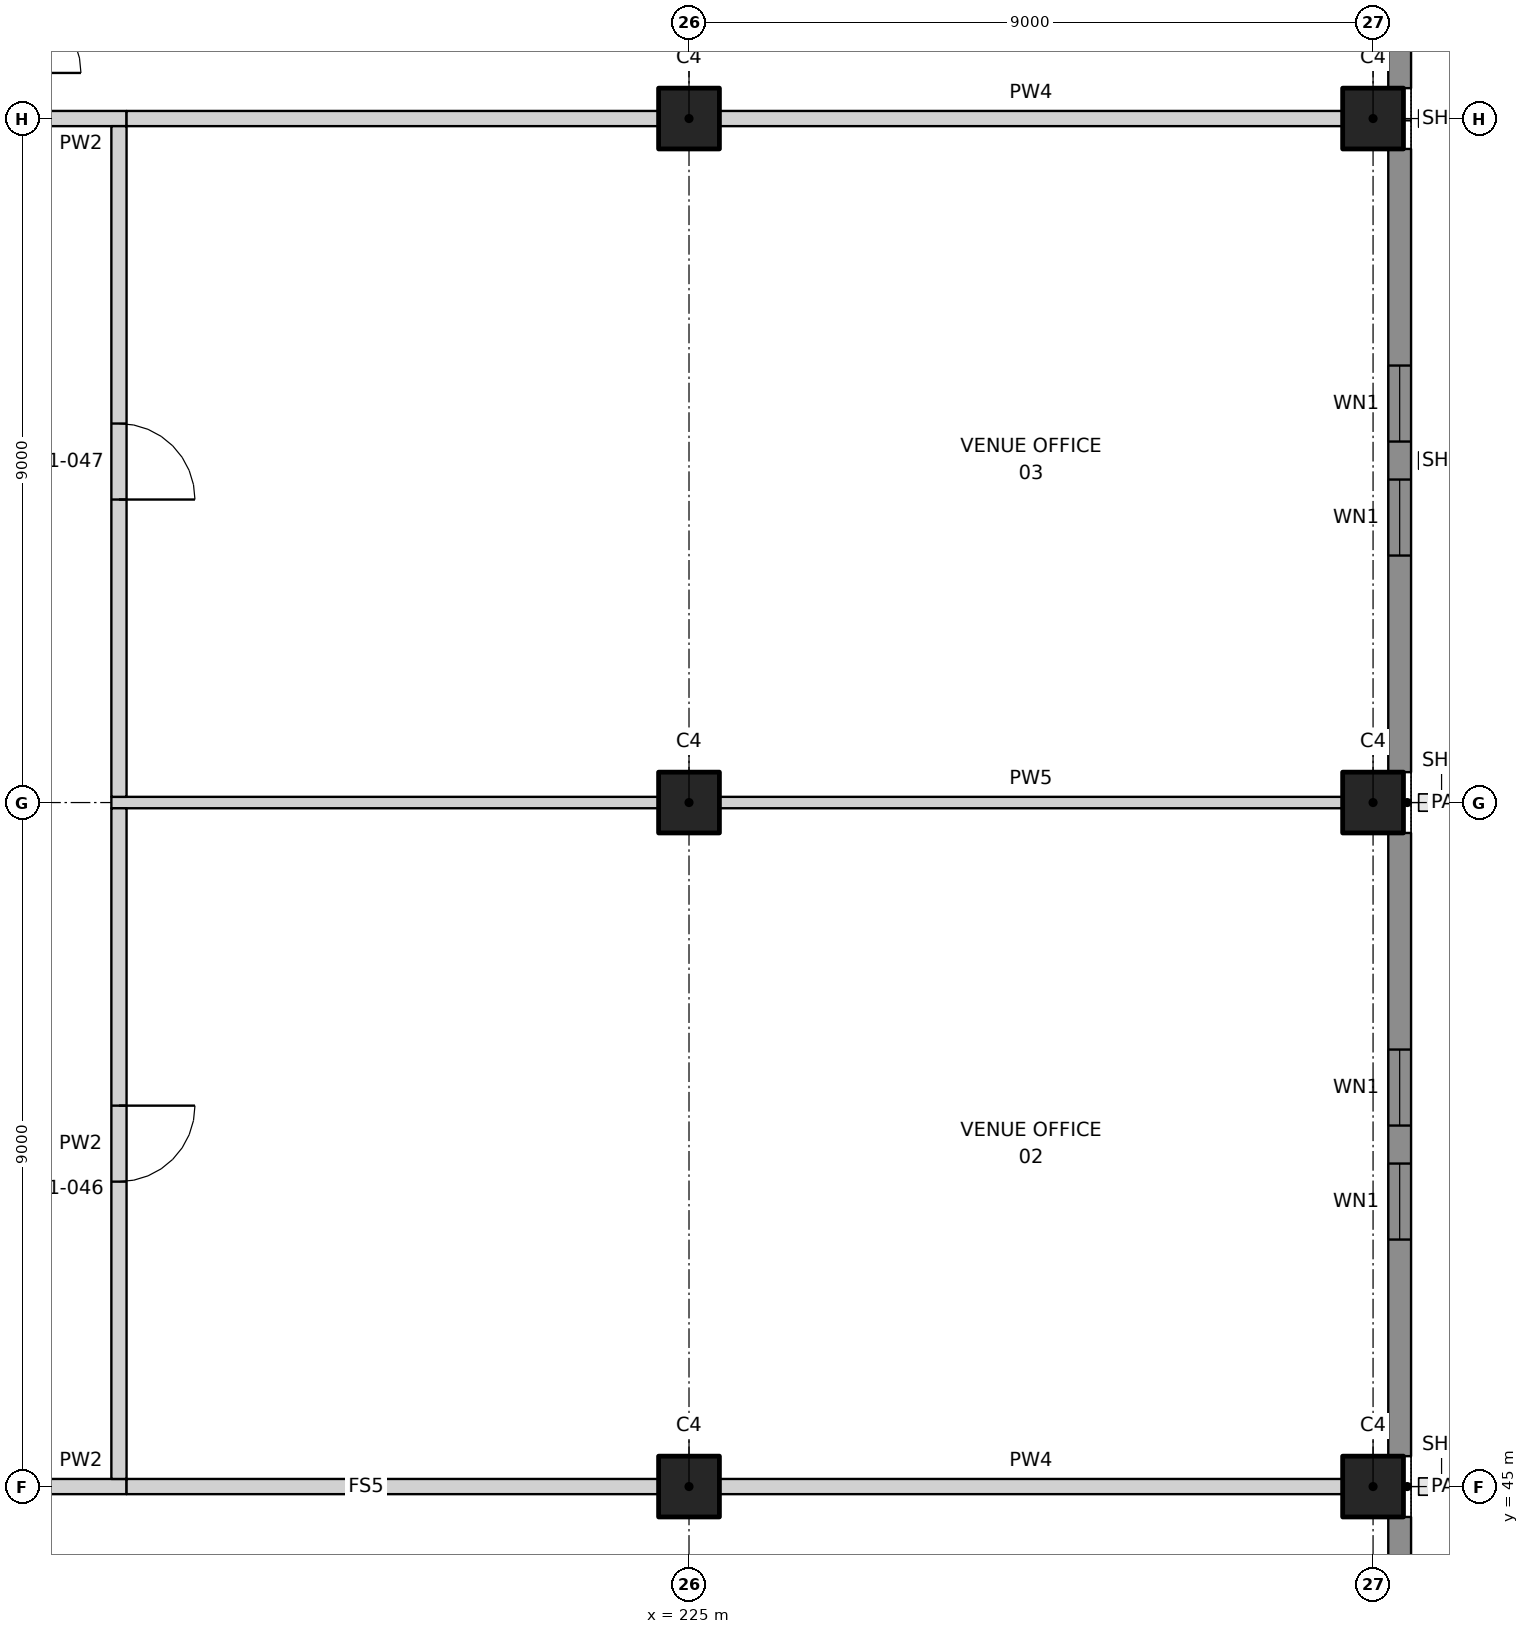
"""IFC4 building model, lengths in metres.
Left out: names, types, materials, properties, quantities, classifications, styles, units other than length and angle.
Written with IfcOpenShell. Run it as: python <this file> out.ifc"""

import sys

from ifc_helpers import new_model, si_unit, direction, frame, frame_2d, origin, origin_2d, place, context, subcontext, project, spatial, rectangle, extrude, element, fill, save


model = new_model("IFC4")
c1 = context("Model", 3, precision=1e-05, world=origin(), true_north=direction((0.0, 1.0)))
c2 = subcontext(c1, "Body", "Model", "MODEL_VIEW")
j1 = project(units=[si_unit("LENGTHUNIT", "METRE"), si_unit("PLANEANGLEUNIT", "RADIAN")], contexts=[c1])
p1 = place(None, origin())
s1 = spatial("IfcSite", under=j1, at=p1, CompositionType="ELEMENT")
p2 = place(p1, origin())
s2 = spatial("IfcBuilding", under=s1, at=p2, CompositionType="ELEMENT")
p3 = place(p2, frame((0.0, 0.0, 7.0)))
s3 = spatial("IfcBuildingStorey", under=s2, at=p3, CompositionType="ELEMENT", Elevation=7.0)
for number, where, z_axis, x_axis in (
    (1, (225.0, 45.0, 0.0), (0.0, 0.0, 1.0), (1.0, 0.0, 0.0)),
    (2, (225.0, 54.0, 0.0), (0.0, 0.0, 1.0), (1.0, 0.0, 0.0)),
    (3, (225.0, 63.0, 0.0), (0.0, 0.0, 1.0), (1.0, 0.0, 0.0)),
    (4, (234.0, 45.0, 0.0), (0.0, 0.0, 1.0), (1.0, 0.0, 0.0)),
    (5, (234.0, 54.0, 0.0), (0.0, 0.0, 1.0), (1.0, 0.0, 0.0)),
    (6, (234.0, 63.0, 0.0), (0.0, 0.0, 1.0), (1.0, 0.0, 0.0)),
):
    element("IfcColumn", number, at=place(p3, frame(where, z_axis=z_axis, x_axis=x_axis)), inside=s3, PredefinedType="COLUMN", context=c2, shape_type="SweptSolid", body=[
        extrude(rectangle(XDim=0.8, YDim=0.8, at=origin_2d()), origin(), (0.0, 0.0, 1.0), 4.5),
    ])
p4 = place(p3, frame((216.4, 45.0, 0.0), z_axis=(0.0, 0.0, 1.0), x_axis=(1.0, 0.0, 0.0)))
e7 = element("IfcWall", 7, at=p4, inside=s3, PredefinedType="PARTITIONING", context=c2, shape_type="SweptSolid", body=[
    extrude(rectangle(XDim=1.2, YDim=0.2, at=frame_2d((0.6, 0.0))), origin(), (0.0, 0.0, 1.0), 3.25),
])
p5 = place(p3, frame((225.4, 45.0, 0.0), z_axis=(0.0, 0.0, 1.0), x_axis=(1.0, 0.0, 0.0)))
e8 = element("IfcWall", 8, at=p5, inside=s3, PredefinedType="PARTITIONING", context=c2, shape_type="SweptSolid", body=[
    extrude(rectangle(XDim=8.2, YDim=0.2, at=frame_2d((4.1, 0.0))), origin(), (0.0, 0.0, 1.0), 3.25),
])
p6 = place(p3, frame((217.6, 45.0, 0.0), z_axis=(0.0, 0.0, 1.0), x_axis=(1.0, 0.0, 0.0)))
e9 = element("IfcWall", 9, at=p6, inside=s3, PredefinedType="PARTITIONING", context=c2, shape_type="SweptSolid", body=[
    extrude(rectangle(XDim=7.0, YDim=0.2, at=frame_2d((3.5, 0.0))), origin(), (0.0, 0.0, 1.0), 3.25),
])
p7 = place(p3, frame((225.4, 54.0, 0.0), z_axis=(0.0, 0.0, 1.0), x_axis=(1.0, 0.0, 0.0)))
e10 = element("IfcWall", 10, at=p7, inside=s3, PredefinedType="PARTITIONING", context=c2, shape_type="SweptSolid", body=[
    extrude(rectangle(XDim=8.2, YDim=0.15, at=frame_2d((4.1, 0.0))), origin(), (0.0, 0.0, 1.0), 3.25),
])
p8 = place(p3, frame((217.4, 54.0, 0.0), z_axis=(0.0, 0.0, 1.0), x_axis=(1.0, 0.0, 0.0)))
e11 = element("IfcWall", 11, at=p8, inside=s3, PredefinedType="PARTITIONING", context=c2, shape_type="SweptSolid", body=[
    extrude(rectangle(XDim=7.2, YDim=0.15, at=frame_2d((3.6, 0.0))), origin(), (0.0, 0.0, 1.0), 3.25),
])
p9 = place(p3, frame((216.4, 63.0, 0.0), z_axis=(0.0, 0.0, 1.0), x_axis=(1.0, 0.0, 0.0)))
e12 = element("IfcWall", 12, at=p9, inside=s3, PredefinedType="PARTITIONING", context=c2, shape_type="SweptSolid", body=[
    extrude(rectangle(XDim=1.2, YDim=0.2, at=frame_2d((0.6, 0.0))), origin(), (0.0, 0.0, 1.0), 3.25),
])
p10 = place(p3, frame((225.4, 63.0, 0.0), z_axis=(0.0, 0.0, 1.0), x_axis=(1.0, 0.0, 0.0)))
e13 = element("IfcWall", 13, at=p10, inside=s3, PredefinedType="PARTITIONING", context=c2, shape_type="SweptSolid", body=[
    extrude(rectangle(XDim=8.2, YDim=0.2, at=frame_2d((4.1, 0.0))), origin(), (0.0, 0.0, 1.0), 3.25),
])
p11 = place(p3, frame((217.6, 63.0, 0.0), z_axis=(0.0, 0.0, 1.0), x_axis=(1.0, 0.0, 0.0)))
e14 = element("IfcWall", 14, at=p11, inside=s3, PredefinedType="PARTITIONING", context=c2, shape_type="SweptSolid", body=[
    extrude(rectangle(XDim=7.0, YDim=0.2, at=frame_2d((3.5, 0.0))), origin(), (0.0, 0.0, 1.0), 3.25),
])
p12 = place(p3, frame((217.5, 45.1, 0.0), z_axis=(0.0, 0.0, 1.0), x_axis=(0.0, 1.0, 0.0)))
e15 = element("IfcWall", 15, at=p12, inside=s3, PredefinedType="PARTITIONING", context=c2, shape_type="SweptSolid", body=[
    extrude(rectangle(XDim=8.825, YDim=0.2, at=frame_2d((4.413, 0.0))), origin(), (0.0, 0.0, 1.0), 4.5),
])
p13 = place(p12, frame((3.912, 0.0, 0.0)))
e16 = element("IfcOpeningElement", 16, at=p13, cuts=e15, PredefinedType="OPENING", context=c2, shape_type="SweptSolid", body=[
    extrude(rectangle(XDim=1.0, YDim=2.1, at=frame_2d((0.5, 1.05))), frame((0.0, 0.11, 0.0), z_axis=(0.0, -1.0, 0.0), x_axis=(1.0, 0.0, 0.0)), (0.0, 0.0, 1.0), 0.22),
])
p14 = place(p3, frame((217.5, 54.075, 0.0), z_axis=(0.0, 0.0, 1.0), x_axis=(0.0, 1.0, 0.0)))
e17 = element("IfcWall", 17, at=p14, inside=s3, PredefinedType="PARTITIONING", context=c2, shape_type="SweptSolid", body=[
    extrude(rectangle(XDim=8.825, YDim=0.2, at=frame_2d((4.413, 0.0))), origin(), (0.0, 0.0, 1.0), 4.5),
])
p15 = place(p14, frame((3.912, 0.0, 0.0)))
e18 = element("IfcOpeningElement", 18, at=p15, cuts=e17, PredefinedType="OPENING", context=c2, shape_type="SweptSolid", body=[
    extrude(rectangle(XDim=1.0, YDim=2.1, at=frame_2d((0.5, 1.05))), frame((0.0, 0.11, 0.0), z_axis=(0.0, -1.0, 0.0), x_axis=(1.0, 0.0, 0.0)), (0.0, 0.0, 1.0), 0.22),
])
p16 = place(p3, frame((234.35, 36.0, 0.0), z_axis=(0.0, 0.0, 1.0), x_axis=(0.0, 1.0, 0.0)))
e19 = element("IfcWall", 19, at=p16, inside=s3, PredefinedType="SOLIDWALL", context=c2, shape_type="SweptSolid", body=[
    extrude(rectangle(XDim=8.6, YDim=0.3, at=frame_2d((4.3, 0.0))), origin(), (0.0, 0.0, 1.0), 4.5),
])
p17 = place(p16, frame((3.25, 0.0, 0.9)))
e20 = element("IfcOpeningElement", 20, at=p17, cuts=e19, PredefinedType="OPENING", context=c2, shape_type="SweptSolid", body=[
    extrude(rectangle(XDim=1.0, YDim=2.1, at=frame_2d((0.5, 1.05))), frame((0.0, 0.16, 0.0), z_axis=(0.0, -1.0, 0.0), x_axis=(1.0, 0.0, 0.0)), (0.0, 0.0, 1.0), 0.32),
])
p18 = place(p16, frame((4.75, 0.0, 0.9)))
e21 = element("IfcOpeningElement", 21, at=p18, cuts=e19, PredefinedType="OPENING", context=c2, shape_type="SweptSolid", body=[
    extrude(rectangle(XDim=1.0, YDim=2.1, at=frame_2d((0.5, 1.05))), frame((0.0, 0.16, 0.0), z_axis=(0.0, -1.0, 0.0), x_axis=(1.0, 0.0, 0.0)), (0.0, 0.0, 1.0), 0.32),
])
p19 = place(p3, frame((234.35, 45.4, 0.0), z_axis=(0.0, 0.0, 1.0), x_axis=(0.0, 1.0, 0.0)))
e22 = element("IfcWall", 22, at=p19, inside=s3, PredefinedType="SOLIDWALL", context=c2, shape_type="SweptSolid", body=[
    extrude(rectangle(XDim=8.2, YDim=0.3, at=frame_2d((4.1, 0.0))), origin(), (0.0, 0.0, 1.0), 4.5),
])
p20 = place(p19, frame((2.85, 0.0, 0.9)))
e23 = element("IfcOpeningElement", 23, at=p20, cuts=e22, PredefinedType="OPENING", context=c2, shape_type="SweptSolid", body=[
    extrude(rectangle(XDim=1.0, YDim=2.1, at=frame_2d((0.5, 1.05))), frame((0.0, 0.16, 0.0), z_axis=(0.0, -1.0, 0.0), x_axis=(1.0, 0.0, 0.0)), (0.0, 0.0, 1.0), 0.32),
])
p21 = place(p19, frame((4.35, 0.0, 0.9)))
e24 = element("IfcOpeningElement", 24, at=p21, cuts=e22, PredefinedType="OPENING", context=c2, shape_type="SweptSolid", body=[
    extrude(rectangle(XDim=1.0, YDim=2.1, at=frame_2d((0.5, 1.05))), frame((0.0, 0.16, 0.0), z_axis=(0.0, -1.0, 0.0), x_axis=(1.0, 0.0, 0.0)), (0.0, 0.0, 1.0), 0.32),
])
p22 = place(p3, frame((234.35, 54.4, 0.0), z_axis=(0.0, 0.0, 1.0), x_axis=(0.0, 1.0, 0.0)))
e25 = element("IfcWall", 25, at=p22, inside=s3, PredefinedType="SOLIDWALL", context=c2, shape_type="SweptSolid", body=[
    extrude(rectangle(XDim=8.2, YDim=0.3, at=frame_2d((4.1, 0.0))), origin(), (0.0, 0.0, 1.0), 4.5),
])
p23 = place(p22, frame((2.85, 0.0, 0.9)))
e26 = element("IfcOpeningElement", 26, at=p23, cuts=e25, PredefinedType="OPENING", context=c2, shape_type="SweptSolid", body=[
    extrude(rectangle(XDim=1.0, YDim=2.1, at=frame_2d((0.5, 1.05))), frame((0.0, 0.16, 0.0), z_axis=(0.0, -1.0, 0.0), x_axis=(1.0, 0.0, 0.0)), (0.0, 0.0, 1.0), 0.32),
])
p24 = place(p22, frame((4.35, 0.0, 0.9)))
e27 = element("IfcOpeningElement", 27, at=p24, cuts=e25, PredefinedType="OPENING", context=c2, shape_type="SweptSolid", body=[
    extrude(rectangle(XDim=1.0, YDim=2.1, at=frame_2d((0.5, 1.05))), frame((0.0, 0.16, 0.0), z_axis=(0.0, -1.0, 0.0), x_axis=(1.0, 0.0, 0.0)), (0.0, 0.0, 1.0), 0.32),
])
p25 = place(p3, frame((234.35, 63.4, 0.0), z_axis=(0.0, 0.0, 1.0), x_axis=(0.0, 1.0, 0.0)))
e28 = element("IfcWall", 28, at=p25, inside=s3, PredefinedType="SOLIDWALL", context=c2, shape_type="SweptSolid", body=[
    extrude(rectangle(XDim=8.2, YDim=0.3, at=frame_2d((4.1, 0.0))), origin(), (0.0, 0.0, 1.0), 4.5),
])
p26 = place(p25, frame((2.85, 0.0, 0.9)))
e29 = element("IfcOpeningElement", 29, at=p26, cuts=e28, PredefinedType="OPENING", context=c2, shape_type="SweptSolid", body=[
    extrude(rectangle(XDim=1.0, YDim=2.1, at=frame_2d((0.5, 1.05))), frame((0.0, 0.16, 0.0), z_axis=(0.0, -1.0, 0.0), x_axis=(1.0, 0.0, 0.0)), (0.0, 0.0, 1.0), 0.32),
])
p27 = place(p25, frame((4.35, 0.0, 0.9)))
e30 = element("IfcOpeningElement", 30, at=p27, cuts=e28, PredefinedType="OPENING", context=c2, shape_type="SweptSolid", body=[
    extrude(rectangle(XDim=1.0, YDim=2.1, at=frame_2d((0.5, 1.05))), frame((0.0, 0.16, 0.0), z_axis=(0.0, -1.0, 0.0), x_axis=(1.0, 0.0, 0.0)), (0.0, 0.0, 1.0), 0.32),
])
p28 = place(p13, frame((1.0, 0.0, 0.0), z_axis=(0.0, 0.0, 1.0), x_axis=(-1.0, 0.0, 0.0)))
e31 = element("IfcDoor", 31, at=p28, inside=s3, OperationType="SINGLE_SWING_LEFT", PredefinedType="DOOR", context=c2, shape_type="SweptSolid", body=[
    extrude(rectangle(XDim=1.0, YDim=2.1, at=frame_2d((0.5, 1.05))), frame((0.0, 0.025, 0.0), z_axis=(0.0, -1.0, 0.0), x_axis=(1.0, 0.0, 0.0)), (0.0, 0.0, 1.0), 0.05),
])
fill(e16, e31)
p29 = place(p15, frame((1.0, 0.0, 0.0), z_axis=(0.0, 0.0, 1.0), x_axis=(-1.0, 0.0, 0.0)))
e32 = element("IfcDoor", 32, at=p29, inside=s3, OperationType="SINGLE_SWING_RIGHT", PredefinedType="DOOR", context=c2, shape_type="SweptSolid", body=[
    extrude(rectangle(XDim=1.0, YDim=2.1, at=frame_2d((0.5, 1.05))), frame((0.0, 0.025, 0.0), z_axis=(0.0, -1.0, 0.0), x_axis=(1.0, 0.0, 0.0)), (0.0, 0.0, 1.0), 0.05),
])
fill(e18, e32)
p30 = place(p20, origin())
e33 = element("IfcWindow", 33, at=p30, inside=s3, PartitioningType="SINGLE_PANEL", PredefinedType="WINDOW", context=c2, shape_type="SweptSolid", body=[
    extrude(rectangle(XDim=1.0, YDim=2.1, at=frame_2d((0.5, 1.05))), frame((0.0, 0.03, 0.0), z_axis=(0.0, -1.0, 0.0), x_axis=(1.0, 0.0, 0.0)), (0.0, 0.0, 1.0), 0.06),
])
fill(e23, e33)
p31 = place(p21, origin())
e34 = element("IfcWindow", 34, at=p31, inside=s3, PartitioningType="SINGLE_PANEL", PredefinedType="WINDOW", context=c2, shape_type="SweptSolid", body=[
    extrude(rectangle(XDim=1.0, YDim=2.1, at=frame_2d((0.5, 1.05))), frame((0.0, 0.03, 0.0), z_axis=(0.0, -1.0, 0.0), x_axis=(1.0, 0.0, 0.0)), (0.0, 0.0, 1.0), 0.06),
])
fill(e24, e34)
p32 = place(p23, origin())
e35 = element("IfcWindow", 35, at=p32, inside=s3, PartitioningType="SINGLE_PANEL", PredefinedType="WINDOW", context=c2, shape_type="SweptSolid", body=[
    extrude(rectangle(XDim=1.0, YDim=2.1, at=frame_2d((0.5, 1.05))), frame((0.0, 0.03, 0.0), z_axis=(0.0, -1.0, 0.0), x_axis=(1.0, 0.0, 0.0)), (0.0, 0.0, 1.0), 0.06),
])
fill(e26, e35)
p33 = place(p24, origin())
e36 = element("IfcWindow", 36, at=p33, inside=s3, PartitioningType="SINGLE_PANEL", PredefinedType="WINDOW", context=c2, shape_type="SweptSolid", body=[
    extrude(rectangle(XDim=1.0, YDim=2.1, at=frame_2d((0.5, 1.05))), frame((0.0, 0.03, 0.0), z_axis=(0.0, -1.0, 0.0), x_axis=(1.0, 0.0, 0.0)), (0.0, 0.0, 1.0), 0.06),
])
fill(e27, e36)
save(model, sys.argv[1])
